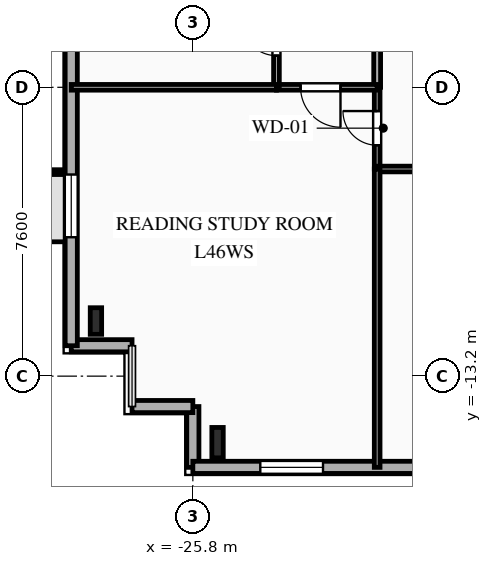
"""IFC4 building model, lengths in metres.
Left out: names, types, materials, properties, quantities, classifications, styles, units other than length and angle.
Written with IfcOpenShell. Run it as: python <this file> out.ifc"""

import sys

from ifc_helpers import new_model, si_unit, direction, frame, frame_2d, origin, origin_2d, place, context, subcontext, project, spatial, rectangle, i_section, extrude, element, fill, save


model = new_model("IFC4")
c1 = context("Model", 3, precision=1e-05, world=origin(), true_north=direction((0.0, 1.0)))
c2 = subcontext(c1, "Body", "Model", "MODEL_VIEW")
j1 = project(units=[si_unit("LENGTHUNIT", "METRE"), si_unit("PLANEANGLEUNIT", "RADIAN")], contexts=[c1])
p1 = place(None, origin())
s1 = spatial("IfcSite", under=j1, at=p1, CompositionType="ELEMENT")
p2 = place(p1, origin())
s2 = spatial("IfcBuilding", under=s1, at=p2, CompositionType="ELEMENT")
p3 = place(p2, frame((0.0, 0.0, 164.5)))
s3 = spatial("IfcBuildingStorey", under=s2, at=p3, CompositionType="ELEMENT", Elevation=164.5)
p4 = place(p3, frame((-25.15, -14.95, 0.0), z_axis=(0.0, 0.0, 1.0), x_axis=(1.0, 0.0, 0.0)))
e1 = element("IfcColumn", 1, at=p4, inside=s3, PredefinedType="COLUMN", context=c2, shape_type="SweptSolid", body=[
    extrude(i_section(OverallWidth=0.3, OverallDepth=0.8, WebThickness=0.018, FlangeThickness=0.033, FilletRadius=0.03, at=origin_2d()), origin(), (0.0, 0.0, 1.0), 3.35),
])
p5 = place(p3, frame((-28.35, -11.75, 0.0), z_axis=(0.0, 0.0, 1.0), x_axis=(1.0, 0.0, 0.0)))
e2 = element("IfcColumn", 2, at=p5, inside=s3, PredefinedType="COLUMN", context=c2, shape_type="SweptSolid", body=[
    extrude(i_section(OverallWidth=0.3, OverallDepth=0.7, WebThickness=0.017, FlangeThickness=0.032, FilletRadius=0.027, at=origin_2d()), origin(), (0.0, 0.0, 1.0), 3.35),
])
p6 = place(p3, frame((-25.8, -15.6, 0.0), z_axis=(0.0, 0.0, 1.0), x_axis=(0.0, 1.0, 0.0)))
e3 = element("IfcWall", 3, at=p6, inside=s3, PredefinedType="SOLIDWALL", context=c2, shape_type="SweptSolid", body=[
    extrude(rectangle(XDim=1.6, YDim=0.32, at=frame_2d((0.8, 0.0))), origin(), (0.0, 0.0, 1.0), 3.04),
])
p7 = place(p3, frame((-25.8, -14.0, 0.0), z_axis=(0.0, 0.0, 1.0), x_axis=(-1.0, 0.0, 0.0)))
e4 = element("IfcWall", 4, at=p7, inside=s3, PredefinedType="SOLIDWALL", context=c2, shape_type="SweptSolid", body=[
    extrude(rectangle(XDim=1.6, YDim=0.32, at=frame_2d((0.8, 0.0))), origin(), (0.0, 0.0, 1.0), 3.04),
])
p8 = place(p3, frame((-27.4, -12.4, 0.0), z_axis=(0.0, 0.0, 1.0), x_axis=(-1.0, 0.0, 0.0)))
e5 = element("IfcWall", 5, at=p8, inside=s3, PredefinedType="SOLIDWALL", context=c2, shape_type="SweptSolid", body=[
    extrude(rectangle(XDim=1.6, YDim=0.32, at=frame_2d((0.8, 0.0))), origin(), (0.0, 0.0, 1.0), 3.04),
])
p9 = place(p3, frame((-29.0, -12.4, 0.0), z_axis=(0.0, 0.0, 1.0), x_axis=(0.0, 1.0, 0.0)))
e6 = element("IfcWall", 6, at=p9, inside=s3, PredefinedType="SOLIDWALL", context=c2, shape_type="SweptSolid", body=[
    extrude(rectangle(XDim=29.6, YDim=0.32, at=frame_2d((14.8, 0.0))), origin(), (0.0, 0.0, 1.0), 3.04),
])
p10 = place(p9, frame((2.855, 0.0, 0.85)))
e7 = element("IfcOpeningElement", 7, at=p10, cuts=e6, PredefinedType="OPENING", context=c2, shape_type="SweptSolid", body=[
    extrude(rectangle(XDim=1.65, YDim=1.85, at=frame_2d((0.825, 0.925))), frame((0.0, 0.17, 0.0), z_axis=(0.0, -1.0, 0.0), x_axis=(1.0, 0.0, 0.0)), (0.0, 0.0, 1.0), 0.34),
])
p11 = place(p9, frame((9.865, 0.0, 0.85)))
e8 = element("IfcOpeningElement", 8, at=p11, cuts=e6, PredefinedType="OPENING", context=c2, shape_type="SweptSolid", body=[
    extrude(rectangle(XDim=1.95, YDim=1.85, at=frame_2d((0.975, 0.925))), frame((0.0, 0.17, 0.0), z_axis=(0.0, -1.0, 0.0), x_axis=(1.0, 0.0, 0.0)), (0.0, 0.0, 1.0), 0.34),
])
p12 = place(p9, frame((13.13, 0.0, 0.85)))
e9 = element("IfcOpeningElement", 9, at=p12, cuts=e6, PredefinedType="OPENING", context=c2, shape_type="SweptSolid", body=[
    extrude(rectangle(XDim=1.5, YDim=1.85, at=frame_2d((0.75, 0.925))), frame((0.0, 0.17, 0.0), z_axis=(0.0, -1.0, 0.0), x_axis=(1.0, 0.0, 0.0)), (0.0, 0.0, 1.0), 0.34),
])
p13 = place(p9, frame((15.93, 0.0, 0.85)))
e10 = element("IfcOpeningElement", 10, at=p13, cuts=e6, PredefinedType="OPENING", context=c2, shape_type="SweptSolid", body=[
    extrude(rectangle(XDim=1.5, YDim=1.85, at=frame_2d((0.75, 0.925))), frame((0.0, 0.17, 0.0), z_axis=(0.0, -1.0, 0.0), x_axis=(1.0, 0.0, 0.0)), (0.0, 0.0, 1.0), 0.34),
])
p14 = place(p9, frame((18.77, 0.0, 0.85)))
e11 = element("IfcOpeningElement", 11, at=p14, cuts=e6, PredefinedType="OPENING", context=c2, shape_type="SweptSolid", body=[
    extrude(rectangle(XDim=1.5, YDim=1.85, at=frame_2d((0.75, 0.925))), frame((0.0, 0.17, 0.0), z_axis=(0.0, -1.0, 0.0), x_axis=(1.0, 0.0, 0.0)), (0.0, 0.0, 1.0), 0.34),
])
p15 = place(p9, frame((24.255, 0.0, 0.85)))
e12 = element("IfcOpeningElement", 12, at=p15, cuts=e6, PredefinedType="OPENING", context=c2, shape_type="SweptSolid", body=[
    extrude(rectangle(XDim=1.65, YDim=1.85, at=frame_2d((0.825, 0.925))), frame((0.0, 0.17, 0.0), z_axis=(0.0, -1.0, 0.0), x_axis=(1.0, 0.0, 0.0)), (0.0, 0.0, 1.0), 0.34),
])
p16 = place(p3, frame((23.8, -15.6, 0.0), z_axis=(0.0, 0.0, 1.0), x_axis=(-1.0, 0.0, 0.0)))
e13 = element("IfcWall", 13, at=p16, inside=s3, PredefinedType="SOLIDWALL", context=c2, shape_type="SweptSolid", body=[
    extrude(rectangle(XDim=49.6, YDim=0.32, at=frame_2d((24.8, 0.0))), origin(), (0.0, 0.0, 1.0), 3.04),
])
p17 = place(p16, frame((1.13, 0.0, 0.85)))
e14 = element("IfcOpeningElement", 14, at=p17, cuts=e13, PredefinedType="OPENING", context=c2, shape_type="SweptSolid", body=[
    extrude(rectangle(XDim=1.1, YDim=1.85, at=frame_2d((0.55, 0.925))), frame((0.0, 0.17, 0.0), z_axis=(0.0, -1.0, 0.0), x_axis=(1.0, 0.0, 0.0)), (0.0, 0.0, 1.0), 0.34),
])
p18 = place(p16, frame((5.695, 0.0, 0.85)))
e15 = element("IfcOpeningElement", 15, at=p18, cuts=e13, PredefinedType="OPENING", context=c2, shape_type="SweptSolid", body=[
    extrude(rectangle(XDim=1.65, YDim=1.85, at=frame_2d((0.825, 0.925))), frame((0.0, 0.17, 0.0), z_axis=(0.0, -1.0, 0.0), x_axis=(1.0, 0.0, 0.0)), (0.0, 0.0, 1.0), 0.34),
])
p19 = place(p16, frame((12.975, 0.0, 0.85)))
e16 = element("IfcOpeningElement", 16, at=p19, cuts=e13, PredefinedType="OPENING", context=c2, shape_type="SweptSolid", body=[
    extrude(rectangle(XDim=1.65, YDim=1.85, at=frame_2d((0.825, 0.925))), frame((0.0, 0.17, 0.0), z_axis=(0.0, -1.0, 0.0), x_axis=(1.0, 0.0, 0.0)), (0.0, 0.0, 1.0), 0.34),
])
p20 = place(p16, frame((21.636, 0.0, 0.85)))
e17 = element("IfcOpeningElement", 17, at=p20, cuts=e13, PredefinedType="OPENING", context=c2, shape_type="SweptSolid", body=[
    extrude(rectangle(XDim=2.2, YDim=1.85, at=frame_2d((1.1, 0.925))), frame((0.0, 0.17, 0.0), z_axis=(0.0, -1.0, 0.0), x_axis=(1.0, 0.0, 0.0)), (0.0, 0.0, 1.0), 0.34),
])
p21 = place(p16, frame((33.935, 0.0, 0.85)))
e18 = element("IfcOpeningElement", 18, at=p21, cuts=e13, PredefinedType="OPENING", context=c2, shape_type="SweptSolid", body=[
    extrude(rectangle(XDim=1.65, YDim=1.85, at=frame_2d((0.825, 0.925))), frame((0.0, 0.17, 0.0), z_axis=(0.0, -1.0, 0.0), x_axis=(1.0, 0.0, 0.0)), (0.0, 0.0, 1.0), 0.34),
])
p22 = place(p16, frame((41.24, 0.0, 0.85)))
e19 = element("IfcOpeningElement", 19, at=p22, cuts=e13, PredefinedType="OPENING", context=c2, shape_type="SweptSolid", body=[
    extrude(rectangle(XDim=1.65, YDim=1.85, at=frame_2d((0.825, 0.925))), frame((0.0, 0.17, 0.0), z_axis=(0.0, -1.0, 0.0), x_axis=(1.0, 0.0, 0.0)), (0.0, 0.0, 1.0), 0.34),
])
p23 = place(p16, frame((46.175, 0.0, 0.85)))
e20 = element("IfcOpeningElement", 20, at=p23, cuts=e13, PredefinedType="OPENING", context=c2, shape_type="SweptSolid", body=[
    extrude(rectangle(XDim=1.65, YDim=1.85, at=frame_2d((0.825, 0.925))), frame((0.0, 0.17, 0.0), z_axis=(0.0, -1.0, 0.0), x_axis=(1.0, 0.0, 0.0)), (0.0, 0.0, 1.0), 0.34),
])
p24 = place(p3, frame((-20.95, -7.75, 0.0), z_axis=(0.0, 0.0, 1.0), x_axis=(0.0, 1.0, 0.0)))
e21 = element("IfcWall", 21, at=p24, inside=s3, PredefinedType="PARTITIONING", context=c2, shape_type="SweptSolid", body=[
    extrude(rectangle(XDim=2.15, YDim=0.15, at=frame_2d((1.075, 0.0))), origin(), (0.0, 0.0, 1.0), 3.04),
])
p25 = place(p24, frame((0.625, 0.0, 0.0)))
e22 = element("IfcOpeningElement", 22, at=p25, cuts=e21, PredefinedType="OPENING", context=c2, shape_type="SweptSolid", body=[
    extrude(rectangle(XDim=0.9, YDim=2.1, at=frame_2d((0.45, 1.05))), frame((0.0, 0.085, 0.0), z_axis=(0.0, -1.0, 0.0), x_axis=(1.0, 0.0, 0.0)), (0.0, 0.0, 1.0), 0.17),
])
p26 = place(p3, frame((-14.267, -7.75, 0.0), z_axis=(0.0, 0.0, 1.0), x_axis=(-1.0, 0.0, 0.0)))
e23 = element("IfcWall", 23, at=p26, inside=s3, PredefinedType="PARTITIONING", context=c2, shape_type="SweptSolid", body=[
    extrude(rectangle(XDim=6.683, YDim=0.15, at=frame_2d((3.342, 0.0))), origin(), (0.0, 0.0, 1.0), 3.04),
])
p27 = place(p26, frame((1.139, 0.0, 0.0)))
e24 = element("IfcOpeningElement", 24, at=p27, cuts=e23, PredefinedType="OPENING", context=c2, shape_type="SweptSolid", body=[
    extrude(rectangle(XDim=1.05, YDim=2.15, at=frame_2d((0.525, 1.075))), frame((0.0, 0.085, 0.0), z_axis=(0.0, -1.0, 0.0), x_axis=(1.0, 0.0, 0.0)), (0.0, 0.0, 1.0), 0.17),
])
p28 = place(p3, frame((-20.95, -5.6, 0.0), z_axis=(0.0, 0.0, 1.0), x_axis=(0.0, 1.0, 0.0)))
e25 = element("IfcWall", 25, at=p28, inside=s3, PredefinedType="PARTITIONING", context=c2, shape_type="SweptSolid", body=[
    extrude(rectangle(XDim=14.1, YDim=0.18, at=frame_2d((7.05, 0.0))), origin(), (0.0, 0.0, 1.0), 3.04),
])
p29 = place(p28, frame((5.058, 0.0, 0.0)))
e26 = element("IfcOpeningElement", 26, at=p29, cuts=e25, PredefinedType="OPENING", context=c2, shape_type="SweptSolid", body=[
    extrude(rectangle(XDim=1.0, YDim=2.15, at=frame_2d((0.5, 1.075))), frame((0.0, 0.1, 0.0), z_axis=(0.0, -1.0, 0.0), x_axis=(1.0, 0.0, 0.0)), (0.0, 0.0, 1.0), 0.2),
])
p30 = place(p3, frame((-20.95, -5.6, 0.0), z_axis=(0.0, 0.0, 1.0), x_axis=(-1.0, 0.0, 0.0)))
e27 = element("IfcWall", 27, at=p30, inside=s3, PredefinedType="PARTITIONING", context=c2, shape_type="SweptSolid", body=[
    extrude(rectangle(XDim=2.65, YDim=0.15, at=frame_2d((1.325, 0.0))), origin(), (0.0, 0.0, 1.0), 3.04),
])
p31 = place(p30, frame((0.965, 0.0, 0.0)))
e28 = element("IfcOpeningElement", 28, at=p31, cuts=e27, PredefinedType="OPENING", context=c2, shape_type="SweptSolid", body=[
    extrude(rectangle(XDim=1.05, YDim=2.15, at=frame_2d((0.525, 1.075))), frame((0.0, 0.085, 0.0), z_axis=(0.0, -1.0, 0.0), x_axis=(1.0, 0.0, 0.0)), (0.0, 0.0, 1.0), 0.17),
])
p32 = place(p3, frame((-23.6, -5.6, 0.0), z_axis=(0.0, 0.0, 1.0), x_axis=(0.0, 1.0, 0.0)))
e29 = element("IfcWall", 29, at=p32, inside=s3, PredefinedType="PLUMBINGWALL", context=c2, shape_type="SweptSolid", body=[
    extrude(rectangle(XDim=2.35, YDim=0.15, at=frame_2d((1.175, 0.0))), origin(), (0.0, 0.0, 1.0), 2.695),
])
p33 = place(p32, frame((0.834, 0.0, 0.0)))
e30 = element("IfcOpeningElement", 30, at=p33, cuts=e29, PredefinedType="OPENING", context=c2, shape_type="SweptSolid", body=[
    extrude(rectangle(XDim=0.9, YDim=2.1, at=frame_2d((0.45, 1.05))), frame((0.0, 0.085, 0.0), z_axis=(0.0, -1.0, 0.0), x_axis=(1.0, 0.0, 0.0)), (0.0, 0.0, 1.0), 0.17),
])
p34 = place(p3, frame((-29.0, -5.6, 0.0), z_axis=(0.0, 0.0, 1.0), x_axis=(1.0, 0.0, 0.0)))
e31 = element("IfcWall", 31, at=p34, inside=s3, PredefinedType="PLUMBINGWALL", context=c2, shape_type="SweptSolid", body=[
    extrude(rectangle(XDim=5.4, YDim=0.15, at=frame_2d((2.7, 0.0))), origin(), (0.0, 0.0, 1.0), 3.04),
])
p35 = place(p3, frame((-20.95, -7.75, 0.0), z_axis=(0.0, 0.0, 1.0), x_axis=(0.0, -1.0, 0.0)))
e32 = element("IfcWall", 32, at=p35, inside=s3, PredefinedType="PARTITIONING", context=c2, shape_type="SweptSolid", body=[
    extrude(rectangle(XDim=7.85, YDim=0.15, at=frame_2d((3.925, 0.0))), origin(), (0.0, 0.0, 1.0), 3.04),
])
p36 = place(p10, origin())
e33 = element("IfcWindow", 33, at=p36, inside=s3, PartitioningType="SINGLE_PANEL", PredefinedType="WINDOW", context=c2, shape_type="SweptSolid", body=[
    extrude(rectangle(XDim=1.65, YDim=1.85, at=frame_2d((0.825, 0.925))), frame((0.0, 0.03, 0.0), z_axis=(0.0, -1.0, 0.0), x_axis=(1.0, 0.0, 0.0)), (0.0, 0.0, 1.0), 0.06),
])
fill(e7, e33)
p37 = place(p23, origin())
e34 = element("IfcWindow", 34, at=p37, inside=s3, PartitioningType="SINGLE_PANEL", PredefinedType="WINDOW", context=c2, shape_type="SweptSolid", body=[
    extrude(rectangle(XDim=1.65, YDim=1.85, at=frame_2d((0.825, 0.925))), frame((0.0, 0.03, 0.0), z_axis=(0.0, -1.0, 0.0), x_axis=(1.0, 0.0, 0.0)), (0.0, 0.0, 1.0), 0.06),
])
fill(e20, e34)
p38 = place(p25, origin())
e35 = element("IfcDoor", 35, at=p38, inside=s3, OperationType="SINGLE_SWING_RIGHT", PredefinedType="DOOR", context=c2, shape_type="SweptSolid", body=[
    extrude(rectangle(XDim=0.9, YDim=2.1, at=frame_2d((0.45, 1.05))), frame((0.0, 0.025, 0.0), z_axis=(0.0, -1.0, 0.0), x_axis=(1.0, 0.0, 0.0)), (0.0, 0.0, 1.0), 0.05),
])
fill(e22, e35)
p39 = place(p31, origin())
e36 = element("IfcDoor", 36, at=p39, inside=s3, OperationType="SINGLE_SWING_LEFT", PredefinedType="DOOR", context=c2, shape_type="SweptSolid", body=[
    extrude(rectangle(XDim=1.05, YDim=2.15, at=frame_2d((0.525, 1.075))), frame((0.0, 0.025, 0.0), z_axis=(0.0, -1.0, 0.0), x_axis=(1.0, 0.0, 0.0)), (0.0, 0.0, 1.0), 0.05),
])
fill(e28, e36)
p40 = place(p33, origin())
e37 = element("IfcDoor", 37, at=p40, inside=s3, OperationType="SINGLE_SWING_RIGHT", PredefinedType="DOOR", context=c2, shape_type="SweptSolid", body=[
    extrude(rectangle(XDim=0.9, YDim=2.1, at=frame_2d((0.45, 1.05))), frame((0.0, 0.025, 0.0), z_axis=(0.0, -1.0, 0.0), x_axis=(1.0, 0.0, 0.0)), (0.0, 0.0, 1.0), 0.05),
])
fill(e30, e37)
save(model, sys.argv[1])
